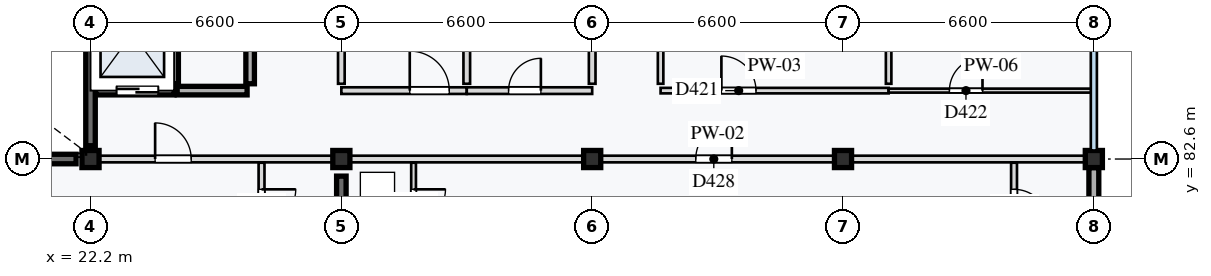
"""IFC4 building model, lengths in metres.
Left out: names, types, materials, properties, quantities, classifications, styles, units other than length and angle.
Written with IfcOpenShell. Run it as: python <this file> out.ifc"""

import sys

from ifc_helpers import new_model, si_unit, direction, frame, frame_2d, origin, origin_2d, place, context, subcontext, project, spatial, rectangle, extrude, element, fill, save


model = new_model("IFC4")
c1 = context("Model", 3, precision=1e-05, world=origin(), true_north=direction((0.0, 1.0)))
c2 = subcontext(c1, "Body", "Model", "MODEL_VIEW")
j1 = project(units=[si_unit("LENGTHUNIT", "METRE"), si_unit("PLANEANGLEUNIT", "RADIAN")], contexts=[c1])
p1 = place(None, origin())
s1 = spatial("IfcSite", under=j1, at=p1, CompositionType="ELEMENT")
p2 = place(p1, origin())
s2 = spatial("IfcBuilding", under=s1, at=p2, CompositionType="ELEMENT")
p3 = place(p2, frame((0.0, 0.0, 43.6)))
s3 = spatial("IfcBuildingStorey", under=s2, at=p3, CompositionType="ELEMENT", Elevation=43.6)
for number, where, z_axis, x_axis in (
    (1, (22.2, 82.6, 0.0), (0.0, 0.0, 1.0), (1.0, 0.0, 0.0)),
    (2, (28.8, 82.6, 0.0), (0.0, 0.0, 1.0), (1.0, 0.0, 0.0)),
    (3, (35.4, 82.6, 0.0), (0.0, 0.0, 1.0), (1.0, 0.0, 0.0)),
    (4, (42.0, 82.6, 0.0), (0.0, 0.0, 1.0), (1.0, 0.0, 0.0)),
    (5, (48.6, 82.6, 0.0), (0.0, 0.0, 1.0), (1.0, 0.0, 0.0)),
):
    element("IfcColumn", number, at=place(p3, frame(where, z_axis=z_axis, x_axis=x_axis)), inside=s3, PredefinedType="COLUMN", context=c2, shape_type="SweptSolid", body=[
        extrude(rectangle(XDim=0.45, YDim=0.45, at=origin_2d()), origin(), (0.0, 0.0, 1.0), 3.2),
    ])
p4 = place(p3, frame((15.98, 82.6, 0.0), z_axis=(0.0, 0.0, 1.0), x_axis=(1.0, 0.0, 0.0)))
e6 = element("IfcWall", 6, at=p4, inside=s3, PredefinedType="SHEAR", context=c2, shape_type="SweptSolid", body=[
    extrude(rectangle(XDim=5.84, YDim=0.25, at=frame_2d((2.92, 0.0))), origin(), (0.0, 0.0, 1.0), 2.98),
])
p5 = place(p3, frame((22.2, 82.95, 0.0), z_axis=(0.0, 0.0, 1.0), x_axis=(0.0, 1.0, 0.0)))
e7 = element("IfcWall", 7, at=p5, inside=s3, PredefinedType="SHEAR", context=c2, shape_type="SweptSolid", body=[
    extrude(rectangle(XDim=2.8, YDim=0.25, at=frame_2d((1.4, 0.0))), origin(), (0.0, 0.0, 1.0), 2.98),
])
p6 = place(p3, frame((28.8, 76.45, 0.0), z_axis=(0.0, 0.0, 1.0), x_axis=(0.0, 1.0, 0.0)))
e8 = element("IfcWall", 8, at=p6, inside=s3, PredefinedType="SHEAR", context=c2, shape_type="SweptSolid", body=[
    extrude(rectangle(XDim=5.7, YDim=0.25, at=frame_2d((2.85, 0.0))), origin(), (0.0, 0.0, 1.0), 2.98),
])
p7 = place(p3, frame((48.6, 76.225, 0.0), z_axis=(0.0, 0.0, 1.0), x_axis=(0.0, 1.0, 0.0)))
e9 = element("IfcWall", 9, at=p7, inside=s3, PredefinedType="STANDARD", context=c2, shape_type="SweptSolid", body=[
    extrude(rectangle(XDim=6.15, YDim=0.26, at=frame_2d((3.075, 0.0))), origin(), (0.0, 0.0, 1.0), 2.65),
])
p8 = place(p3, frame((22.335, 84.4, 0.0), z_axis=(0.0, 0.0, 1.0), x_axis=(1.0, 0.0, 0.0)))
e10 = element("IfcWall", 10, at=p8, inside=s3, PredefinedType="STANDARD", context=c2, shape_type="SweptSolid", body=[
    extrude(rectangle(XDim=2.065, YDim=0.225, at=frame_2d((1.032, 0.0))), origin(), (0.0, 0.0, 1.0), 2.98),
])
p9 = place(p8, frame((0.55, 0.0, 0.0)))
e11 = element("IfcOpeningElement", 11, at=p9, cuts=e10, PredefinedType="OPENING", context=c2, shape_type="SweptSolid", body=[
    extrude(rectangle(XDim=1.1, YDim=2.1, at=frame_2d((0.55, 1.05))), frame((0.0, 0.123, 0.0), z_axis=(0.0, -1.0, 0.0), x_axis=(1.0, 0.0, 0.0)), (0.0, 0.0, 1.0), 0.245),
])
p10 = place(p3, frame((24.48, 84.4, 0.0), z_axis=(0.0, 0.0, 1.0), x_axis=(1.0, 0.0, 0.0)))
e12 = element("IfcWall", 12, at=p10, inside=s3, PredefinedType="STANDARD", context=c2, shape_type="SweptSolid", body=[
    extrude(rectangle(XDim=1.84, YDim=0.225, at=frame_2d((0.92, 0.0))), origin(), (0.0, 0.0, 1.0), 2.98),
])
for number, where, z_axis, x_axis in (
    (13, (24.4, 84.58, 0.0), (0.0, 0.0, 1.0), (0.0, 1.0, 0.0)),
    (14, (26.4, 84.58, 0.0), (0.0, 0.0, 1.0), (0.0, 1.0, 0.0)),
):
    element("IfcWall", number, at=place(p3, frame(where, z_axis=z_axis, x_axis=x_axis)), inside=s3, PredefinedType="STANDARD", context=c2, shape_type="SweptSolid", body=[
        extrude(rectangle(XDim=2.64, YDim=0.225, at=frame_2d((1.32, 0.0))), origin(), (0.0, 0.0, 1.0), 2.98),
    ])
p11 = place(p3, frame((28.8, 84.4, 0.0), z_axis=(0.0, 0.0, 1.0), x_axis=(1.0, 0.0, 0.0)))
e15 = element("IfcWall", 15, at=p11, inside=s3, PredefinedType="PARTITIONING", context=c2, shape_type="SweptSolid", body=[
    extrude(rectangle(XDim=3.3, YDim=0.175, at=frame_2d((1.65, 0.0))), origin(), (0.0, 0.0, 1.0), 2.98),
])
p12 = place(p11, frame((1.8, 0.0, 0.0)))
e16 = element("IfcOpeningElement", 16, at=p12, cuts=e15, PredefinedType="OPENING", context=c2, shape_type="SweptSolid", body=[
    extrude(rectangle(XDim=1.04, YDim=2.12, at=frame_2d((0.52, 1.06))), frame((0.0, 0.097, 0.0), z_axis=(0.0, -1.0, 0.0), x_axis=(1.0, 0.0, 0.0)), (0.0, 0.0, 1.0), 0.195),
])
p13 = place(p3, frame((32.1, 84.4, 0.0), z_axis=(0.0, 0.0, 1.0), x_axis=(1.0, 0.0, 0.0)))
e17 = element("IfcWall", 17, at=p13, inside=s3, PredefinedType="PARTITIONING", context=c2, shape_type="SweptSolid", body=[
    extrude(rectangle(XDim=3.3, YDim=0.175, at=frame_2d((1.65, 0.0))), origin(), (0.0, 0.0, 1.0), 2.98),
])
p14 = place(p13, frame((1.1, 0.0, 0.0)))
e18 = element("IfcOpeningElement", 18, at=p14, cuts=e17, PredefinedType="OPENING", context=c2, shape_type="SweptSolid", body=[
    extrude(rectangle(XDim=0.85, YDim=2.0, at=frame_2d((0.425, 1.0))), frame((0.0, 0.097, 0.0), z_axis=(0.0, -1.0, 0.0), x_axis=(1.0, 0.0, 0.0)), (0.0, 0.0, 1.0), 0.195),
])
for number, where, z_axis, x_axis in (
    (19, (28.8, 84.58, 0.0), (0.0, 0.0, 1.0), (0.0, 1.0, 0.0)),
    (20, (32.1, 84.58, 0.0), (0.0, 0.0, 1.0), (0.0, 1.0, 0.0)),
    (21, (35.4, 84.58, 0.0), (0.0, 0.0, 1.0), (0.0, 1.0, 0.0)),
):
    element("IfcWall", number, at=place(p3, frame(where, z_axis=z_axis, x_axis=x_axis)), inside=s3, PredefinedType="PARTITIONING", context=c2, shape_type="SweptSolid", body=[
        extrude(rectangle(XDim=1.14, YDim=0.175, at=frame_2d((0.57, 0.0))), origin(), (0.0, 0.0, 1.0), 2.98),
    ])
p15 = place(p3, frame((37.2, 84.4, 0.0), z_axis=(0.0, 0.0, 1.0), x_axis=(1.0, 0.0, 0.0)))
e22 = element("IfcWall", 22, at=p15, inside=s3, PredefinedType="PARTITIONING", context=c2, shape_type="SweptSolid", body=[
    extrude(rectangle(XDim=6.0, YDim=0.145, at=frame_2d((3.0, 0.0))), origin(), (0.0, 0.0, 1.0), 2.98),
])
p16 = place(p15, frame((1.6, 0.0, 0.0)))
e23 = element("IfcOpeningElement", 23, at=p16, cuts=e22, PredefinedType="OPENING", context=c2, shape_type="SweptSolid", body=[
    extrude(rectangle(XDim=0.91, YDim=2.14, at=frame_2d((0.455, 1.07))), frame((0.0, 0.083, 0.0), z_axis=(0.0, -1.0, 0.0), x_axis=(1.0, 0.0, 0.0)), (0.0, 0.0, 1.0), 0.165),
])
p17 = place(p3, frame((43.2, 84.4, 0.0), z_axis=(0.0, 0.0, 1.0), x_axis=(1.0, 0.0, 0.0)))
e24 = element("IfcWall", 24, at=p17, inside=s3, PredefinedType="PARTITIONING", context=c2, shape_type="SweptSolid", body=[
    extrude(rectangle(XDim=5.4, YDim=0.105, at=frame_2d((2.7, 0.0))), origin(), (0.0, 0.0, 1.0), 2.98),
])
p18 = place(p17, frame((1.6, 0.0, 0.0)))
e25 = element("IfcOpeningElement", 25, at=p18, cuts=e24, PredefinedType="OPENING", context=c2, shape_type="SweptSolid", body=[
    extrude(rectangle(XDim=0.87, YDim=2.08, at=frame_2d((0.435, 1.04))), frame((0.0, 0.062, 0.0), z_axis=(0.0, -1.0, 0.0), x_axis=(1.0, 0.0, 0.0)), (0.0, 0.0, 1.0), 0.125),
])
for number, where, z_axis, x_axis in (
    (26, (43.2, 84.58, 0.0), (0.0, 0.0, 1.0), (0.0, 1.0, 0.0)),
    (27, (37.2, 84.58, 0.0), (0.0, 0.0, 1.0), (0.0, 1.0, 0.0)),
):
    element("IfcWall", number, at=place(p3, frame(where, z_axis=z_axis, x_axis=x_axis)), inside=s3, PredefinedType="PARTITIONING", context=c2, shape_type="SweptSolid", body=[
        extrude(rectangle(XDim=2.64, YDim=0.145, at=frame_2d((1.32, 0.0))), origin(), (0.0, 0.0, 1.0), 2.98),
    ])
p19 = place(p3, frame((22.2, 82.6, 0.0), z_axis=(0.0, 0.0, 1.0), x_axis=(1.0, 0.0, 0.0)))
e28 = element("IfcWall", 28, at=p19, inside=s3, PredefinedType="PARTITIONING", context=c2, shape_type="SweptSolid", body=[
    extrude(rectangle(XDim=6.6, YDim=0.175, at=frame_2d((3.3, 0.0))), origin(), (0.0, 0.0, 1.0), 2.7),
])
p20 = place(p19, frame((1.7, 0.0, 0.0)))
e29 = element("IfcOpeningElement", 29, at=p20, cuts=e28, PredefinedType="OPENING", context=c2, shape_type="SweptSolid", body=[
    extrude(rectangle(XDim=0.95, YDim=2.1, at=frame_2d((0.475, 1.05))), frame((0.0, 0.097, 0.0), z_axis=(0.0, -1.0, 0.0), x_axis=(1.0, 0.0, 0.0)), (0.0, 0.0, 1.0), 0.195),
])
p21 = place(p3, frame((26.7, 82.502, 0.0), z_axis=(0.0, 0.0, 1.0), x_axis=(0.0, -1.0, 0.0)))
e30 = element("IfcWall", 30, at=p21, inside=s3, PredefinedType="PARTITIONING", context=c2, shape_type="SweptSolid", body=[
    extrude(rectangle(XDim=2.302, YDim=0.155, at=frame_2d((1.151, 0.0))), origin(), (0.0, 0.0, 1.0), 2.98),
])
p22 = place(p21, frame((0.7, 0.0, 0.0)))
e31 = element("IfcOpeningElement", 31, at=p22, cuts=e30, PredefinedType="OPENING", context=c2, shape_type="SweptSolid", body=[
    extrude(rectangle(XDim=0.9, YDim=2.16, at=frame_2d((0.45, 1.08))), frame((0.0, 0.087, 0.0), z_axis=(0.0, -1.0, 0.0), x_axis=(1.0, 0.0, 0.0)), (0.0, 0.0, 1.0), 0.175),
])
p23 = place(p3, frame((28.8, 82.6, 0.0), z_axis=(0.0, 0.0, 1.0), x_axis=(1.0, 0.0, 0.0)))
e32 = element("IfcWall", 32, at=p23, inside=s3, PredefinedType="PARTITIONING", context=c2, shape_type="SweptSolid", body=[
    extrude(rectangle(XDim=19.8, YDim=0.175, at=frame_2d((9.9, 0.0))), origin(), (0.0, 0.0, 1.0), 2.7),
])
p24 = place(p23, frame((9.325, 0.0, 0.0)))
e33 = element("IfcOpeningElement", 33, at=p24, cuts=e32, PredefinedType="OPENING", context=c2, shape_type="SweptSolid", body=[
    extrude(rectangle(XDim=0.95, YDim=2.16, at=frame_2d((0.475, 1.08))), frame((0.0, 0.097, 0.0), z_axis=(0.0, -1.0, 0.0), x_axis=(1.0, 0.0, 0.0)), (0.0, 0.0, 1.0), 0.195),
])
p25 = place(p3, frame((30.7, 82.502, 0.0), z_axis=(0.0, 0.0, 1.0), x_axis=(0.0, -1.0, 0.0)))
e34 = element("IfcWall", 34, at=p25, inside=s3, PredefinedType="PARTITIONING", context=c2, shape_type="SweptSolid", body=[
    extrude(rectangle(XDim=2.302, YDim=0.125, at=frame_2d((1.151, 0.0))), origin(), (0.0, 0.0, 1.0), 2.98),
])
p26 = place(p25, frame((0.7, 0.0, 0.0)))
e35 = element("IfcOpeningElement", 35, at=p26, cuts=e34, PredefinedType="OPENING", context=c2, shape_type="SweptSolid", body=[
    extrude(rectangle(XDim=0.84, YDim=2.06, at=frame_2d((0.42, 1.03))), frame((0.0, 0.073, 0.0), z_axis=(0.0, -1.0, 0.0), x_axis=(1.0, 0.0, 0.0)), (0.0, 0.0, 1.0), 0.145),
])
p27 = place(p3, frame((46.5, 82.502, 0.0), z_axis=(0.0, 0.0, 1.0), x_axis=(0.0, -1.0, 0.0)))
e36 = element("IfcWall", 36, at=p27, inside=s3, PredefinedType="PARTITIONING", context=c2, shape_type="SweptSolid", body=[
    extrude(rectangle(XDim=2.302, YDim=0.155, at=frame_2d((1.151, 0.0))), origin(), (0.0, 0.0, 1.0), 2.98),
])
p28 = place(p27, frame((0.7, 0.0, 0.0)))
e37 = element("IfcOpeningElement", 37, at=p28, cuts=e36, PredefinedType="OPENING", context=c2, shape_type="SweptSolid", body=[
    extrude(rectangle(XDim=0.91, YDim=2.14, at=frame_2d((0.455, 1.07))), frame((0.0, 0.087, 0.0), z_axis=(0.0, -1.0, 0.0), x_axis=(1.0, 0.0, 0.0)), (0.0, 0.0, 1.0), 0.175),
])
p29 = place(p9, origin())
e38 = element("IfcDoor", 38, at=p29, inside=s3, OperationType="DOUBLE_DOOR_SLIDING", PredefinedType="DOOR", context=c2, shape_type="SweptSolid", body=[
    extrude(rectangle(XDim=1.1, YDim=2.1, at=frame_2d((0.55, 1.05))), frame((0.0, 0.025, 0.0), z_axis=(0.0, -1.0, 0.0), x_axis=(1.0, 0.0, 0.0)), (0.0, 0.0, 1.0), 0.05),
])
fill(e11, e38)
p30 = place(p12, origin())
e39 = element("IfcDoor", 39, at=p30, inside=s3, OperationType="SINGLE_SWING_LEFT", PredefinedType="DOOR", context=c2, shape_type="SweptSolid", body=[
    extrude(rectangle(XDim=1.04, YDim=2.12, at=frame_2d((0.52, 1.06))), frame((0.0, 0.025, 0.0), z_axis=(0.0, -1.0, 0.0), x_axis=(1.0, 0.0, 0.0)), (0.0, 0.0, 1.0), 0.05),
])
fill(e16, e39)
p31 = place(p14, origin())
e40 = element("IfcDoor", 40, at=p31, inside=s3, OperationType="SINGLE_SWING_RIGHT", PredefinedType="DOOR", context=c2, shape_type="SweptSolid", body=[
    extrude(rectangle(XDim=0.85, YDim=2.0, at=frame_2d((0.425, 1.0))), frame((0.0, 0.025, 0.0), z_axis=(0.0, -1.0, 0.0), x_axis=(1.0, 0.0, 0.0)), (0.0, 0.0, 1.0), 0.05),
])
fill(e18, e40)
p32 = place(p16, origin())
e41 = element("IfcDoor", 41, at=p32, inside=s3, OperationType="SINGLE_SWING_LEFT", PredefinedType="DOOR", context=c2, shape_type="SweptSolid", body=[
    extrude(rectangle(XDim=0.91, YDim=2.14, at=frame_2d((0.455, 1.07))), frame((0.0, 0.025, 0.0), z_axis=(0.0, -1.0, 0.0), x_axis=(1.0, 0.0, 0.0)), (0.0, 0.0, 1.0), 0.05),
])
fill(e23, e41)
p33 = place(p18, origin())
e42 = element("IfcDoor", 42, at=p33, inside=s3, OperationType="SINGLE_SWING_RIGHT", PredefinedType="DOOR", context=c2, shape_type="SweptSolid", body=[
    extrude(rectangle(XDim=0.87, YDim=2.08, at=frame_2d((0.435, 1.04))), frame((0.0, 0.025, 0.0), z_axis=(0.0, -1.0, 0.0), x_axis=(1.0, 0.0, 0.0)), (0.0, 0.0, 1.0), 0.05),
])
fill(e25, e42)
p34 = place(p20, origin())
e43 = element("IfcDoor", 43, at=p34, inside=s3, OperationType="SINGLE_SWING_LEFT", PredefinedType="DOOR", context=c2, shape_type="SweptSolid", body=[
    extrude(rectangle(XDim=0.95, YDim=2.1, at=frame_2d((0.475, 1.05))), frame((0.0, 0.025, 0.0), z_axis=(0.0, -1.0, 0.0), x_axis=(1.0, 0.0, 0.0)), (0.0, 0.0, 1.0), 0.05),
])
fill(e29, e43)
p35 = place(p22, origin())
e44 = element("IfcDoor", 44, at=p35, inside=s3, OperationType="SINGLE_SWING_LEFT", PredefinedType="DOOR", context=c2, shape_type="SweptSolid", body=[
    extrude(rectangle(XDim=0.9, YDim=2.16, at=frame_2d((0.45, 1.08))), frame((0.0, 0.025, 0.0), z_axis=(0.0, -1.0, 0.0), x_axis=(1.0, 0.0, 0.0)), (0.0, 0.0, 1.0), 0.05),
])
fill(e31, e44)
p36 = place(p24, origin())
e45 = element("IfcDoor", 45, at=p36, inside=s3, OperationType="SINGLE_SWING_RIGHT", PredefinedType="DOOR", context=c2, shape_type="SweptSolid", body=[
    extrude(rectangle(XDim=0.95, YDim=2.16, at=frame_2d((0.475, 1.08))), frame((0.0, 0.025, 0.0), z_axis=(0.0, -1.0, 0.0), x_axis=(1.0, 0.0, 0.0)), (0.0, 0.0, 1.0), 0.05),
])
fill(e33, e45)
p37 = place(p26, origin())
e46 = element("IfcDoor", 46, at=p37, inside=s3, OperationType="SINGLE_SWING_LEFT", PredefinedType="DOOR", context=c2, shape_type="SweptSolid", body=[
    extrude(rectangle(XDim=0.84, YDim=2.06, at=frame_2d((0.42, 1.03))), frame((0.0, 0.025, 0.0), z_axis=(0.0, -1.0, 0.0), x_axis=(1.0, 0.0, 0.0)), (0.0, 0.0, 1.0), 0.05),
])
fill(e35, e46)
p38 = place(p28, origin())
e47 = element("IfcDoor", 47, at=p38, inside=s3, OperationType="SINGLE_SWING_RIGHT", PredefinedType="DOOR", context=c2, shape_type="SweptSolid", body=[
    extrude(rectangle(XDim=0.91, YDim=2.14, at=frame_2d((0.455, 1.07))), frame((0.0, 0.025, 0.0), z_axis=(0.0, -1.0, 0.0), x_axis=(1.0, 0.0, 0.0)), (0.0, 0.0, 1.0), 0.05),
])
fill(e37, e47)
save(model, sys.argv[1])
